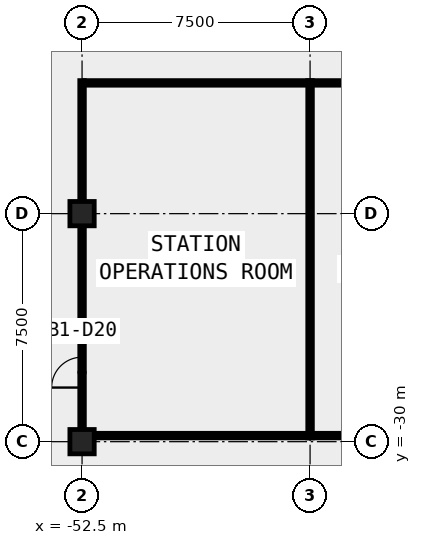
"""IFC4 building model, lengths in metres.
Left out: names, types, materials, properties, quantities, classifications, styles, units other than length and angle.
Written with IfcOpenShell. Run it as: python <this file> out.ifc"""

import sys

from ifc_helpers import new_model, si_unit, direction, frame, frame_2d, origin, origin_2d, place, context, subcontext, project, spatial, rectangle, extrude, element, fill, save


model = new_model("IFC4")
c1 = context("Model", 3, precision=1e-05, world=origin(), true_north=direction((0.0, 1.0)))
c2 = subcontext(c1, "Body", "Model", "MODEL_VIEW")
j1 = project(units=[si_unit("LENGTHUNIT", "METRE"), si_unit("PLANEANGLEUNIT", "RADIAN")], contexts=[c1])
p1 = place(None, origin())
s1 = spatial("IfcSite", under=j1, at=p1, CompositionType="ELEMENT")
p2 = place(p1, origin())
s2 = spatial("IfcBuilding", under=s1, at=p2, CompositionType="ELEMENT")
p3 = place(p2, frame((0.0, 0.0, -5.5)))
s3 = spatial("IfcBuildingStorey", under=s2, at=p3, CompositionType="ELEMENT", Elevation=-5.5)
for number, where, z_axis, x_axis in (
    (1, (-52.5, -30.0, -0.42), (0.0, 0.0, 1.0), (1.0, 0.0, 0.0)),
    (2, (-52.5, -22.5, -0.42), (0.0, 0.0, 1.0), (1.0, 0.0, 0.0)),
):
    element("IfcColumn", number, at=place(p3, frame(where, z_axis=z_axis, x_axis=x_axis)), inside=s3, PredefinedType="COLUMN", context=c2, shape_type="SweptSolid", body=[
        extrude(rectangle(XDim=0.8, YDim=0.8, at=origin_2d()), origin(), (0.0, 0.0, 1.0), 5.72),
    ])
for number, where, z_axis, x_axis in (
    (3, (-52.425, -18.2, 0.0), (0.0, 0.0, 1.0), (1.0, 0.0, 0.0)),
    (4, (-45.075, -29.8, 0.0), (0.0, 0.0, 1.0), (-1.0, 0.0, 0.0)),
):
    element("IfcWall", number, at=place(p3, frame(where, z_axis=z_axis, x_axis=x_axis)), inside=s3, PredefinedType="PARTITIONING", context=c2, shape_type="SweptSolid", body=[
        extrude(rectangle(XDim=7.35, YDim=0.15, at=frame_2d((3.675, 0.0))), origin(), (0.0, 0.0, 1.0), 4.9),
    ])
p4 = place(p3, frame((-52.5, -29.875, 0.0), z_axis=(0.0, 0.0, 1.0), x_axis=(0.0, 1.0, 0.0)))
e5 = element("IfcWall", 5, at=p4, inside=s3, PredefinedType="PARTITIONING", context=c2, shape_type="SweptSolid", body=[
    extrude(rectangle(XDim=11.75, YDim=0.15, at=frame_2d((5.875, 0.0))), origin(), (0.0, 0.0, 1.0), 4.9),
])
p5 = place(p4, frame((1.655, 0.0, 0.0)))
e6 = element("IfcOpeningElement", 6, at=p5, cuts=e5, PredefinedType="OPENING", context=c2, shape_type="SweptSolid", body=[
    extrude(rectangle(XDim=1.0, YDim=2.1, at=frame_2d((0.5, 1.05))), frame((0.0, 0.085, 0.0), z_axis=(0.0, -1.0, 0.0), x_axis=(1.0, 0.0, 0.0)), (0.0, 0.0, 1.0), 0.17),
])
p6 = place(p3, frame((-44.925, -18.2, 0.0), z_axis=(0.0, 0.0, 1.0), x_axis=(1.0, 0.0, 0.0)))
e7 = element("IfcWall", 7, at=p6, inside=s3, PredefinedType="PARTITIONING", context=c2, shape_type="SweptSolid", body=[
    extrude(rectangle(XDim=6.531, YDim=0.15, at=frame_2d((3.266, 0.0))), origin(), (0.0, 0.0, 1.0), 4.9),
])
p7 = place(p3, frame((-37.575, -29.8, 0.0), z_axis=(0.0, 0.0, 1.0), x_axis=(-1.0, 0.0, 0.0)))
e8 = element("IfcWall", 8, at=p7, inside=s3, PredefinedType="PARTITIONING", context=c2, shape_type="SweptSolid", body=[
    extrude(rectangle(XDim=7.35, YDim=0.15, at=frame_2d((3.675, 0.0))), origin(), (0.0, 0.0, 1.0), 4.9),
])
p8 = place(p3, frame((-45.0, -18.125, 0.0), z_axis=(0.0, 0.0, 1.0), x_axis=(0.0, -1.0, 0.0)))
e9 = element("IfcWall", 9, at=p8, inside=s3, PredefinedType="PARTITIONING", context=c2, shape_type="SweptSolid", body=[
    extrude(rectangle(XDim=11.75, YDim=0.15, at=frame_2d((5.875, 0.0))), origin(), (0.0, 0.0, 1.0), 4.9),
])
p9 = place(p5, origin())
e10 = element("IfcDoor", 10, at=p9, inside=s3, OperationType="SINGLE_SWING_RIGHT", PredefinedType="DOOR", context=c2, shape_type="SweptSolid", body=[
    extrude(rectangle(XDim=1.0, YDim=2.1, at=frame_2d((0.5, 1.05))), frame((0.0, 0.025, 0.0), z_axis=(0.0, -1.0, 0.0), x_axis=(1.0, 0.0, 0.0)), (0.0, 0.0, 1.0), 0.05),
])
fill(e6, e10)
save(model, sys.argv[1])
